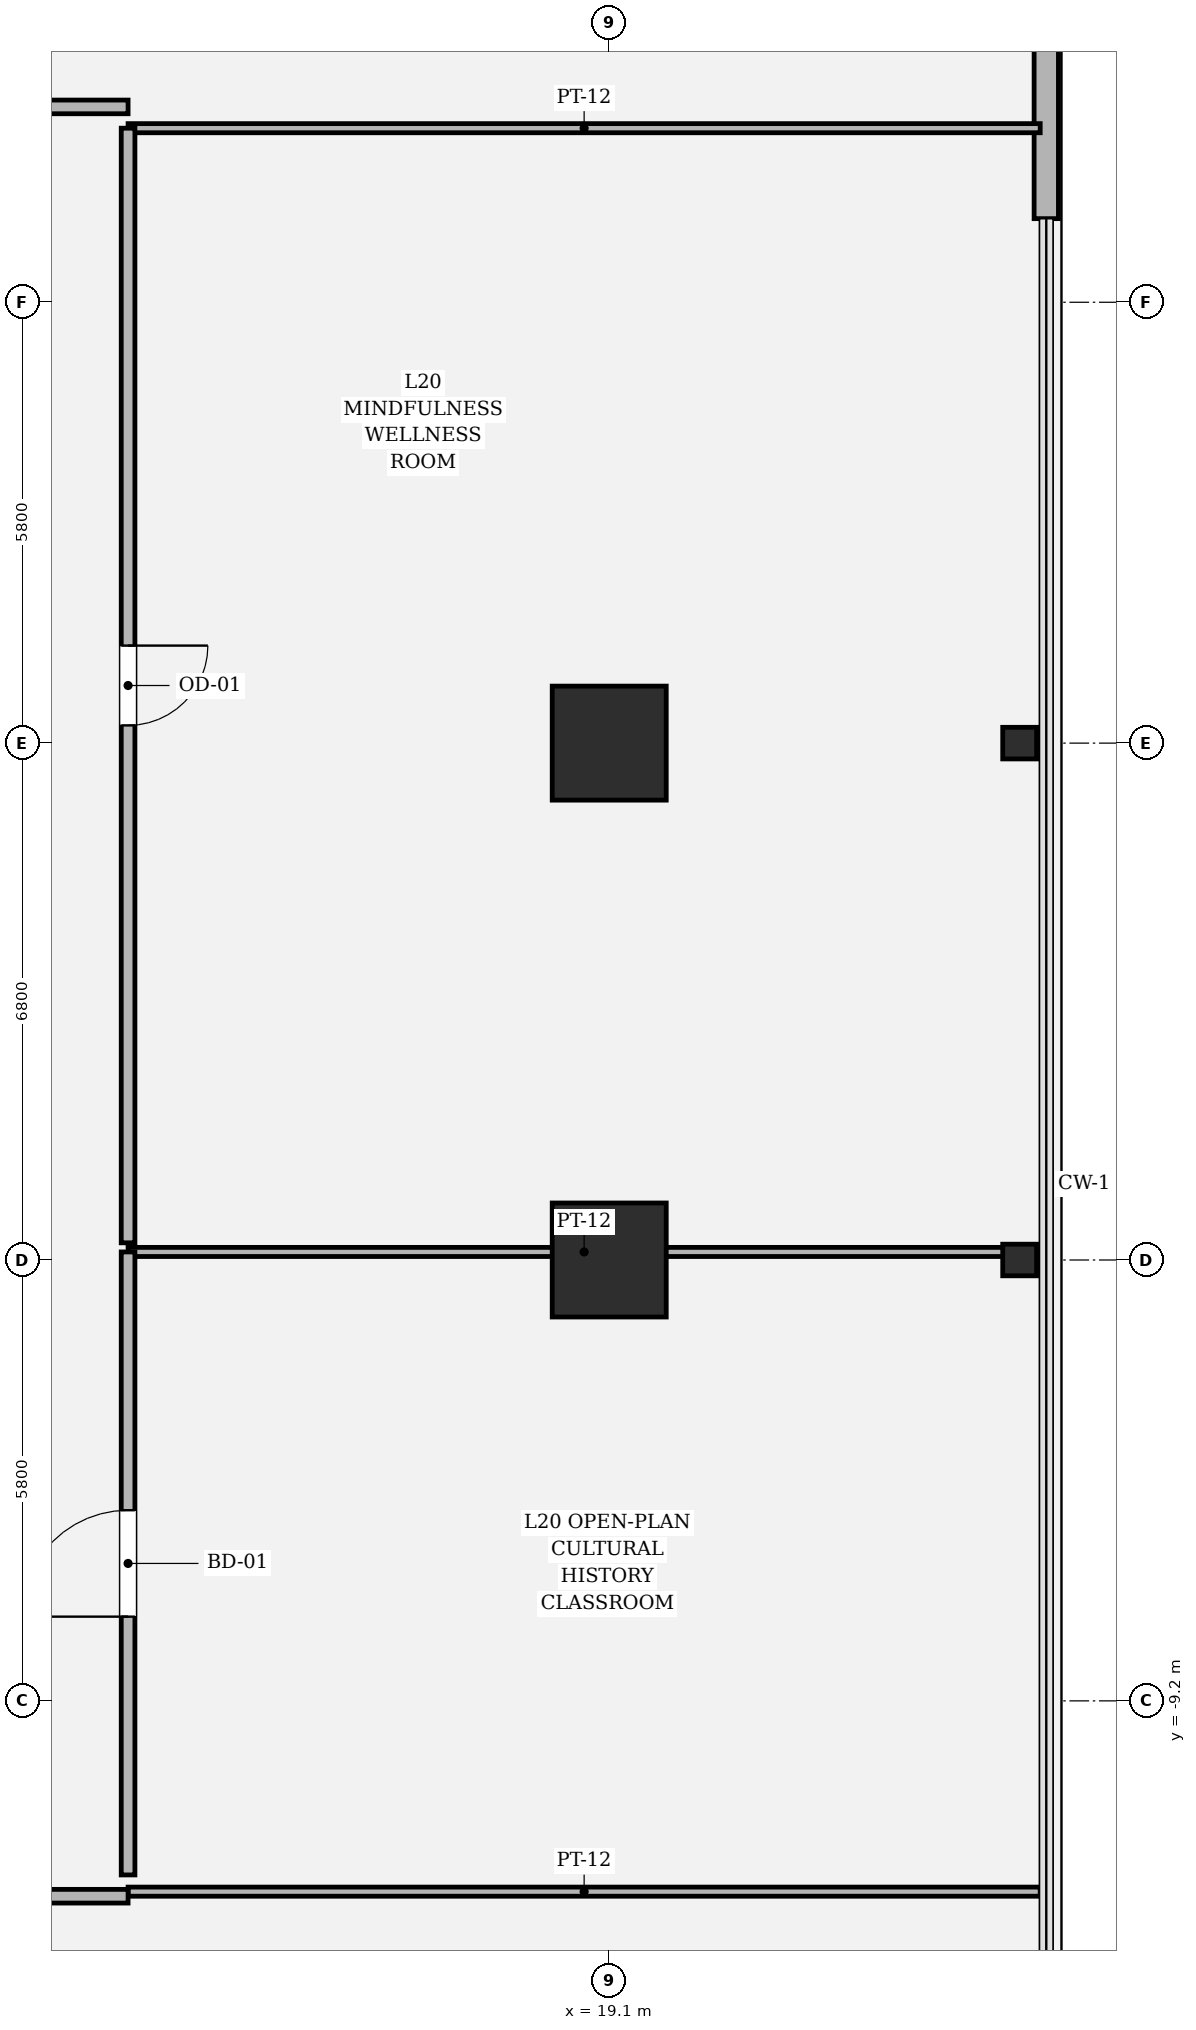
"""IFC4 building model, lengths in metres.
Left out: names, types, materials, properties, quantities, classifications, styles, units other than length and angle.
Written with IfcOpenShell. Run it as: python <this file> out.ifc"""

import sys

from ifc_helpers import new_model, si_unit, direction, frame, frame_2d, origin, origin_2d, place, context, subcontext, project, spatial, rectangle, hollow_rectangle, i_section, extrude, element, fill, save


model = new_model("IFC4")
c1 = context("Model", 3, precision=1e-05, world=origin(), true_north=direction((0.0, 1.0)))
c2 = subcontext(c1, "Body", "Model", "MODEL_VIEW")
j1 = project(units=[si_unit("LENGTHUNIT", "METRE"), si_unit("PLANEANGLEUNIT", "RADIAN")], contexts=[c1])
p1 = place(None, origin())
s1 = spatial("IfcSite", under=j1, at=p1, CompositionType="ELEMENT")
p2 = place(p1, origin())
s2 = spatial("IfcBuilding", under=s1, at=p2, CompositionType="ELEMENT")
p3 = place(p2, frame((0.0, 0.0, 88.95)))
s3 = spatial("IfcBuildingStorey", under=s2, at=p3, CompositionType="ELEMENT", Elevation=88.95)
for number, where, z_axis, x_axis in (
    (1, (19.1, -3.4, 0.0), (0.0, 0.0, 1.0), (1.0, 0.0, 0.0)),
    (2, (19.1, 3.4, 0.0), (0.0, 0.0, 1.0), (1.0, 0.0, 0.0)),
):
    element("IfcColumn", number, at=place(p3, frame(where, z_axis=z_axis, x_axis=x_axis)), inside=s3, PredefinedType="COLUMN", context=c2, shape_type="SweptSolid", body=[
        extrude(hollow_rectangle(XDim=1.5, YDim=1.5, WallThickness=0.045, at=origin_2d()), origin(), (0.0, 0.0, 1.0), 4.05),
    ])
for number, where, z_axis, x_axis in (
    (3, (24.5, -3.4, 0.0), (0.0, 0.0, 1.0), (0.0, 1.0, 0.0)),
    (4, (24.5, 3.4, 0.0), (0.0, 0.0, 1.0), (0.0, 1.0, 0.0)),
):
    element("IfcColumn", number, at=place(p3, frame(where, z_axis=z_axis, x_axis=x_axis)), inside=s3, PredefinedType="COLUMN", context=c2, shape_type="SweptSolid", body=[
        extrude(i_section(OverallWidth=0.416, OverallDepth=0.446, WebThickness=0.039, FlangeThickness=0.062, FilletRadius=0.018, at=origin_2d()), origin(), (0.0, 0.0, 1.0), 4.048),
    ])
p4 = place(p3, frame((24.85, 10.3, 0.0), z_axis=(0.0, 0.0, 1.0), x_axis=(0.0, 1.0, 0.0)))
e5 = element("IfcWall", 5, at=p4, inside=s3, PredefinedType="SOLIDWALL", context=c2, shape_type="SweptSolid", body=[
    extrude(rectangle(XDim=5.137, YDim=0.32, at=frame_2d((2.568, 0.0))), origin(), (0.0, 0.0, 1.0), 2.444),
])
p5 = place(p3, frame((12.77, -11.71, 0.0), z_axis=(0.0, 0.0, 1.0), x_axis=(1.0, 0.0, 0.0)))
e6 = element("IfcWall", 6, at=p5, inside=s3, PredefinedType="PARTITIONING", context=c2, shape_type="SweptSolid", body=[
    extrude(rectangle(XDim=12.0, YDim=0.12, at=frame_2d((6.0, 0.0))), origin(), (0.0, 0.0, 1.0), 2.444),
])
p6 = place(p3, frame((-4.485, -11.77, 0.0), z_axis=(0.0, 0.0, 1.0), x_axis=(1.0, 0.0, 0.0)))
e7 = element("IfcWall", 7, at=p6, inside=s3, PredefinedType="PARTITIONING", context=c2, shape_type="SweptSolid", body=[
    extrude(rectangle(XDim=17.255, YDim=0.18, at=frame_2d((8.627, 0.0))), origin(), (0.0, 0.0, 1.0), 2.444),
])
p7 = place(p6, frame((8.103, 0.0, 0.0)))
e8 = element("IfcOpeningElement", 8, at=p7, cuts=e7, PredefinedType="OPENING", context=c2, shape_type="SweptSolid", body=[
    extrude(rectangle(XDim=1.05, YDim=2.2, at=frame_2d((0.525, 1.1))), frame((0.0, 0.1, 0.0), z_axis=(0.0, -1.0, 0.0), x_axis=(1.0, 0.0, 0.0)), (0.0, 0.0, 1.0), 0.2),
])
p8 = place(p3, frame((12.77, -3.294, 0.0), z_axis=(0.0, 0.0, 1.0), x_axis=(1.0, 0.0, 0.0)))
e9 = element("IfcWall", 9, at=p8, inside=s3, PredefinedType="PARTITIONING", context=c2, shape_type="SweptSolid", body=[
    extrude(rectangle(XDim=12.0, YDim=0.12, at=frame_2d((6.0, 0.0))), origin(), (0.0, 0.0, 1.0), 2.444),
])
p9 = place(p3, frame((12.77, -11.49, 0.0), z_axis=(0.0, 0.0, 1.0), x_axis=(0.0, 1.0, 0.0)))
e10 = element("IfcWall", 10, at=p9, inside=s3, PredefinedType="PARTITIONING", context=c2, shape_type="SweptSolid", body=[
    extrude(rectangle(XDim=8.196, YDim=0.18, at=frame_2d((4.098, 0.0))), origin(), (0.0, 0.0, 1.0), 2.444),
])
p10 = place(p9, frame((3.398, 0.0, 0.0)))
e11 = element("IfcOpeningElement", 11, at=p10, cuts=e10, PredefinedType="OPENING", context=c2, shape_type="SweptSolid", body=[
    extrude(rectangle(XDim=1.4, YDim=2.25, at=frame_2d((0.7, 1.125))), frame((0.0, 0.1, 0.0), z_axis=(0.0, -1.0, 0.0), x_axis=(1.0, 0.0, 0.0)), (0.0, 0.0, 1.0), 0.2),
])
p11 = place(p3, frame((12.77, 11.49, 0.0), z_axis=(0.0, 0.0, 1.0), x_axis=(1.0, 0.0, 0.0)))
e12 = element("IfcWall", 12, at=p11, inside=s3, PredefinedType="PARTITIONING", context=c2, shape_type="SweptSolid", body=[
    extrude(rectangle(XDim=12.0, YDim=0.12, at=frame_2d((6.0, 0.0))), origin(), (0.0, 0.0, 1.0), 2.444),
])
p12 = place(p3, frame((12.77, -3.174, 0.0), z_axis=(0.0, 0.0, 1.0), x_axis=(0.0, 1.0, 0.0)))
e13 = element("IfcWall", 13, at=p12, inside=s3, PredefinedType="PARTITIONING", context=c2, shape_type="SweptSolid", body=[
    extrude(rectangle(XDim=14.664, YDim=0.18, at=frame_2d((7.332, 0.0))), origin(), (0.0, 0.0, 1.0), 2.444),
])
p13 = place(p12, frame((6.807, 0.0, 0.0)))
e14 = element("IfcOpeningElement", 14, at=p13, cuts=e13, PredefinedType="OPENING", context=c2, shape_type="SweptSolid", body=[
    extrude(rectangle(XDim=1.05, YDim=2.2, at=frame_2d((0.525, 1.1))), frame((0.0, 0.1, 0.0), z_axis=(0.0, -1.0, 0.0), x_axis=(1.0, 0.0, 0.0)), (0.0, 0.0, 1.0), 0.2),
])
p14 = place(p3, frame((12.77, 11.77, 0.0), z_axis=(0.0, 0.0, 1.0), x_axis=(-1.0, 0.0, 0.0)))
e15 = element("IfcWall", 15, at=p14, inside=s3, PredefinedType="PARTITIONING", context=c2, shape_type="SweptSolid", body=[
    extrude(rectangle(XDim=18.644, YDim=0.18, at=frame_2d((9.322, 0.0))), origin(), (0.0, 0.0, 1.0), 2.444),
])
p15 = place(p14, frame((8.622, 0.0, 0.0)))
e16 = element("IfcOpeningElement", 16, at=p15, cuts=e15, PredefinedType="OPENING", context=c2, shape_type="SweptSolid", body=[
    extrude(rectangle(XDim=1.4, YDim=2.25, at=frame_2d((0.7, 1.125))), frame((0.0, 0.1, 0.0), z_axis=(0.0, -1.0, 0.0), x_axis=(1.0, 0.0, 0.0)), (0.0, 0.0, 1.0), 0.2),
])
p16 = place(p10, origin())
e17 = element("IfcDoor", 17, at=p16, inside=s3, OperationType="SINGLE_SWING_LEFT", PredefinedType="DOOR", context=c2, shape_type="SweptSolid", body=[
    extrude(rectangle(XDim=1.4, YDim=2.25, at=frame_2d((0.7, 1.125))), frame((0.0, 0.025, 0.0), z_axis=(0.0, -1.0, 0.0), x_axis=(1.0, 0.0, 0.0)), (0.0, 0.0, 1.0), 0.05),
])
fill(e11, e17)
p17 = place(p13, origin())
e18 = element("IfcDoor", 18, at=p17, inside=s3, OperationType="SINGLE_SWING_RIGHT", PredefinedType="DOOR", context=c2, shape_type="SweptSolid", body=[
    extrude(rectangle(XDim=1.05, YDim=2.2, at=frame_2d((0.525, 1.1))), frame((0.0, 0.025, 0.0), z_axis=(0.0, -1.0, 0.0), x_axis=(1.0, 0.0, 0.0)), (0.0, 0.0, 1.0), 0.05),
])
fill(e14, e18)
save(model, sys.argv[1])
